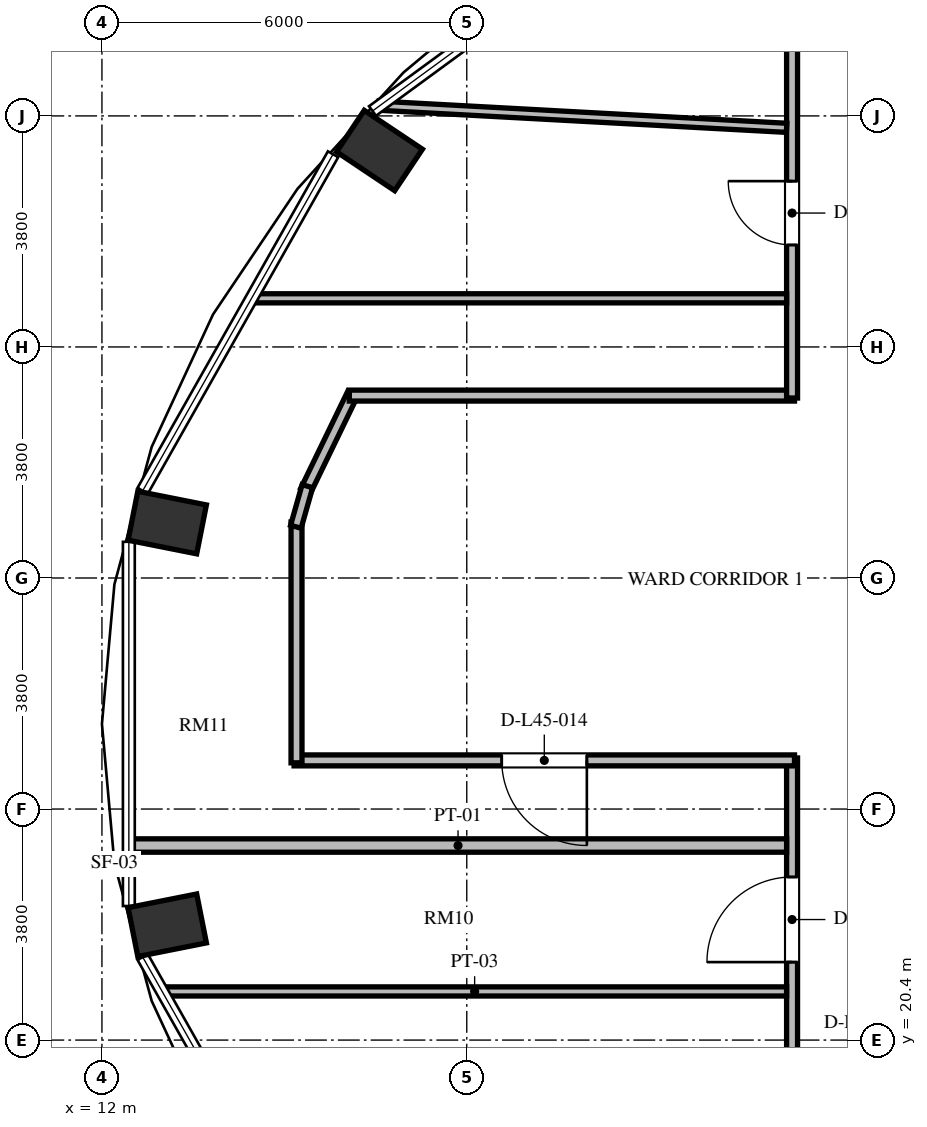
"""IFC4 building model, lengths in metres.
Left out: names, types, materials, properties, quantities, classifications, styles, units other than length and angle.
Written with IfcOpenShell. Run it as: python <this file> out.ifc"""

import sys

from ifc_helpers import new_model, si_unit, direction, frame, frame_2d, origin, origin_2d, place, context, subcontext, project, spatial, rectangle, extrude, element, fill, save


model = new_model("IFC4")
c1 = context("Model", 3, precision=1e-05, world=origin(), true_north=direction((0.0, 1.0)))
c2 = subcontext(c1, "Body", "Model", "MODEL_VIEW")
j1 = project(units=[si_unit("LENGTHUNIT", "METRE"), si_unit("PLANEANGLEUNIT", "RADIAN")], contexts=[c1])
p1 = place(None, origin())
s1 = spatial("IfcSite", under=j1, at=p1, CompositionType="ELEMENT")
p2 = place(p1, origin())
s2 = spatial("IfcBuilding", under=s1, at=p2, CompositionType="ELEMENT")
p3 = place(p2, frame((0.0, 0.0, 174.768)))
s3 = spatial("IfcBuildingStorey", under=s2, at=p3, CompositionType="ELEMENT", Elevation=174.768)
for number, where, z_axis, x_axis in (
    (1, (16.564, 35.031, 0.0), (0.0, 0.0, 1.0), (-0.831, 0.556, 0.0)),
    (2, (13.074, 28.912, 0.0), (0.0, 0.0, 1.0), (-0.981, 0.195, 0.0)),
    (3, (13.074, 22.288, 0.0), (0.0, 0.0, 1.0), (-0.981, -0.195, 0.0)),
):
    element("IfcColumn", number, at=place(p3, frame(where, z_axis=z_axis, x_axis=x_axis)), inside=s3, PredefinedType="COLUMN", context=c2, shape_type="SweptSolid", body=[
        extrude(rectangle(XDim=1.15, YDim=0.82, at=origin_2d()), origin(), (0.0, 0.0, 1.0), 3.648),
    ])
p4 = place(p3, frame((15.35, 29.436, 0.0), z_axis=(0.0, 0.0, 1.0), x_axis=(0.436196025907, 0.899851669434, 0.0)))
e4 = element("IfcWall", 4, at=p4, inside=s3, PredefinedType="PARTITIONING", context=c2, shape_type="SweptSolid", body=[
    extrude(rectangle(XDim=1.778, YDim=0.18, at=frame_2d((0.889, 0.0))), origin(), (0.0, 0.0, 1.0), 3.428),
])
p5 = place(p3, frame((16.068, 31.0, 0.0), z_axis=(0.0, 0.0, 1.0), x_axis=(1.0, 0.0, 0.0)))
e5 = element("IfcWall", 5, at=p5, inside=s3, PredefinedType="PARTITIONING", context=c2, shape_type="SweptSolid", body=[
    extrude(rectangle(XDim=7.322, YDim=0.18, at=frame_2d((3.661, 0.0))), origin(), (0.0, 0.0, 1.0), 3.428),
])
p6 = place(p3, frame((23.35, 30.96, 0.0), z_axis=(0.0, 0.0, 1.0), x_axis=(0.0, 1.0, 0.0)))
e6 = element("IfcWall", 6, at=p6, inside=s3, PredefinedType="PARTITIONING", context=c2, shape_type="SweptSolid", body=[
    extrude(rectangle(XDim=6.714, YDim=0.18, at=frame_2d((3.357, 0.0))), origin(), (0.0, 0.0, 1.0), 3.428),
])
p7 = place(p6, frame((2.517, 0.0, 0.0)))
e7 = element("IfcOpeningElement", 7, at=p7, cuts=e6, PredefinedType="OPENING", context=c2, shape_type="SweptSolid", body=[
    extrude(rectangle(XDim=1.05, YDim=2.15, at=frame_2d((0.525, 1.075))), frame((0.0, 0.1, 0.0), z_axis=(0.0, -1.0, 0.0), x_axis=(1.0, 0.0, 0.0)), (0.0, 0.0, 1.0), 0.2),
])
p8 = place(p3, frame((23.35, 19.98, 0.0), z_axis=(0.0, 0.0, 1.0), x_axis=(0.0, 1.0, 0.0)))
e8 = element("IfcWall", 8, at=p8, inside=s3, PredefinedType="PARTITIONING", context=c2, shape_type="SweptSolid", body=[
    extrude(rectangle(XDim=5.06, YDim=0.18, at=frame_2d((2.53, 0.0))), origin(), (0.0, 0.0, 1.0), 3.428),
])
p9 = place(p8, frame((1.702, 0.0, 0.0)))
e9 = element("IfcOpeningElement", 9, at=p9, cuts=e8, PredefinedType="OPENING", context=c2, shape_type="SweptSolid", body=[
    extrude(rectangle(XDim=1.4, YDim=2.2, at=frame_2d((0.7, 1.1))), frame((0.0, 0.1, 0.0), z_axis=(0.0, -1.0, 0.0), x_axis=(1.0, 0.0, 0.0)), (0.0, 0.0, 1.0), 0.2),
])
p10 = place(p3, frame((23.39, 25.0, 0.0), z_axis=(0.0, 0.0, 1.0), x_axis=(-1.0, 0.0, 0.0)))
e10 = element("IfcWall", 10, at=p10, inside=s3, PredefinedType="PARTITIONING", context=c2, shape_type="SweptSolid", body=[
    extrude(rectangle(XDim=8.23, YDim=0.18, at=frame_2d((4.115, 0.0))), origin(), (0.0, 0.0, 1.0), 3.428),
])
p11 = place(p10, frame((3.415, 0.0, 0.0)))
e11 = element("IfcOpeningElement", 11, at=p11, cuts=e10, PredefinedType="OPENING", context=c2, shape_type="SweptSolid", body=[
    extrude(rectangle(XDim=1.4, YDim=2.2, at=frame_2d((0.7, 1.1))), frame((0.0, 0.1, 0.0), z_axis=(0.0, -1.0, 0.0), x_axis=(1.0, 0.0, 0.0)), (0.0, 0.0, 1.0), 0.2),
])
p12 = place(p3, frame((15.2, 24.96, 0.0), z_axis=(0.0, 0.0, 1.0), x_axis=(0.0, 1.0, 0.0)))
e12 = element("IfcWall", 12, at=p12, inside=s3, PredefinedType="PARTITIONING", context=c2, shape_type="SweptSolid", body=[
    extrude(rectangle(XDim=3.961, YDim=0.18, at=frame_2d((1.98, 0.0))), origin(), (0.0, 0.0, 1.0), 3.428),
])
p13 = place(p3, frame((15.189, 28.843, 0.0), z_axis=(0.0, 0.0, 1.0), x_axis=(0.272862960331, 0.962052911684, 0.0)))
e13 = element("IfcWall", 13, at=p13, inside=s3, PredefinedType="PARTITIONING", context=c2, shape_type="SweptSolid", body=[
    extrude(rectangle(XDim=0.694, YDim=0.18, at=frame_2d((0.347, 0.0))), origin(), (0.0, 0.0, 1.0), 3.428),
])
p14 = place(p3, frame((12.999, 21.2, 0.0), z_axis=(0.0, 0.0, 1.0), x_axis=(1.0, 0.0, 0.0)))
e14 = element("IfcWall", 14, at=p14, inside=s3, PredefinedType="PARTITIONING", context=c2, shape_type="SweptSolid", body=[
    extrude(rectangle(XDim=10.261, YDim=0.15, at=frame_2d((5.131, 0.0))), origin(), (0.0, 0.0, 1.0), 2.863),
])
p15 = place(p3, frame((12.453, 23.6, 0.0), z_axis=(0.0, 0.0, 1.0), x_axis=(1.0, 0.0, 0.0)))
e15 = element("IfcWall", 15, at=p15, inside=s3, PredefinedType="PARTITIONING", context=c2, shape_type="SweptSolid", body=[
    extrude(rectangle(XDim=10.807, YDim=0.22, at=frame_2d((5.404, 0.0))), origin(), (0.0, 0.0, 1.0), 3.428),
])
p16 = place(p3, frame((14.469, 32.6, 0.0), z_axis=(0.0, 0.0, 1.0), x_axis=(1.0, 0.0, 0.0)))
e16 = element("IfcWall", 16, at=p16, inside=s3, PredefinedType="PARTITIONING", context=c2, shape_type="SweptSolid", body=[
    extrude(rectangle(XDim=8.791, YDim=0.15, at=frame_2d((4.396, 0.0))), origin(), (0.0, 0.0, 1.0), 3.428),
])
p17 = place(p3, frame((16.554, 35.768, 0.0), z_axis=(0.0, 0.0, 1.0), x_axis=(0.998529801792, -0.054205488039, 0.0)))
e17 = element("IfcWall", 17, at=p17, inside=s3, PredefinedType="PARTITIONING", context=c2, shape_type="SweptSolid", body=[
    extrude(rectangle(XDim=6.715, YDim=0.15, at=frame_2d((3.358, 0.0))), origin(), (0.0, 0.0, 1.0), 2.863),
])
p18 = place(p9, origin())
e18 = element("IfcDoor", 18, at=p18, inside=s3, OperationType="SINGLE_SWING_LEFT", PredefinedType="DOOR", context=c2, shape_type="SweptSolid", body=[
    extrude(rectangle(XDim=1.4, YDim=2.2, at=frame_2d((0.7, 1.1))), frame((0.0, 0.025, 0.0), z_axis=(0.0, -1.0, 0.0), x_axis=(1.0, 0.0, 0.0)), (0.0, 0.0, 1.0), 0.05),
])
fill(e9, e18)
p19 = place(p7, origin())
e19 = element("IfcDoor", 19, at=p19, inside=s3, OperationType="SINGLE_SWING_RIGHT", PredefinedType="DOOR", context=c2, shape_type="SweptSolid", body=[
    extrude(rectangle(XDim=1.05, YDim=2.15, at=frame_2d((0.525, 1.075))), frame((0.0, 0.025, 0.0), z_axis=(0.0, -1.0, 0.0), x_axis=(1.0, 0.0, 0.0)), (0.0, 0.0, 1.0), 0.05),
])
fill(e7, e19)
p20 = place(p11, origin())
e20 = element("IfcDoor", 20, at=p20, inside=s3, OperationType="SINGLE_SWING_LEFT", PredefinedType="DOOR", context=c2, shape_type="SweptSolid", body=[
    extrude(rectangle(XDim=1.4, YDim=2.2, at=frame_2d((0.7, 1.1))), frame((0.0, 0.025, 0.0), z_axis=(0.0, -1.0, 0.0), x_axis=(1.0, 0.0, 0.0)), (0.0, 0.0, 1.0), 0.05),
])
fill(e11, e20)
save(model, sys.argv[1])
